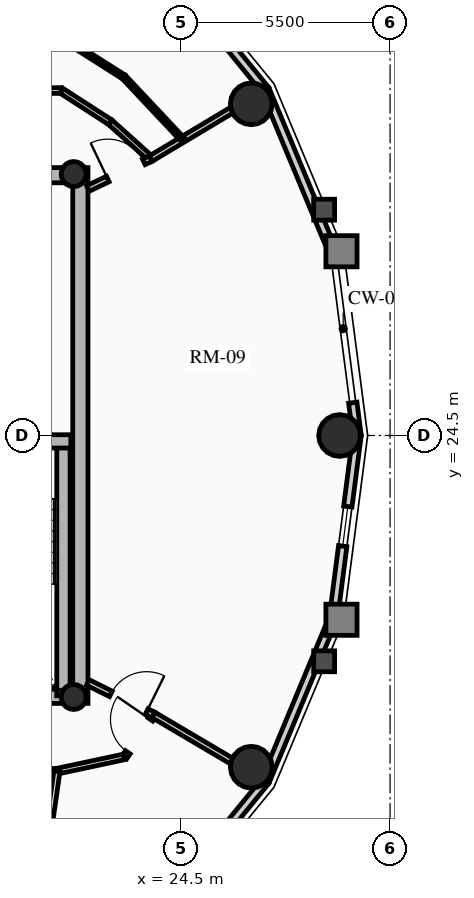
"""IFC4 building model, lengths in metres.
Left out: names, types, materials, properties, quantities, classifications, styles, units other than length and angle.
Written with IfcOpenShell. Run it as: python <this file> out.ifc"""

import sys

from ifc_helpers import new_model, si_unit, direction, frame, frame_2d, origin, origin_2d, place, context, subcontext, project, spatial, rectangle, circle, hollow_circle, extrude, source, transform, mapped, element, fill, save


model = new_model("IFC4")
c1 = context("Model", 3, precision=1e-05, world=origin(), true_north=direction((0.0, 1.0)))
c2 = subcontext(c1, "Body", "Model", "MODEL_VIEW")
j1 = project(units=[si_unit("LENGTHUNIT", "METRE"), si_unit("PLANEANGLEUNIT", "RADIAN")], contexts=[c1])
p1 = place(None, origin())
s1 = spatial("IfcSite", under=j1, at=p1, CompositionType="ELEMENT")
p2 = place(p1, origin())
s2 = spatial("IfcBuilding", under=s1, at=p2, CompositionType="ELEMENT")
p3 = place(p2, frame((0.0, 0.0, 214.12)))
s3 = spatial("IfcBuildingStorey", under=s2, at=p3, CompositionType="ELEMENT", Elevation=214.12)
p4 = place(p3, frame((21.85, 17.45, 0.0), z_axis=(0.0, 0.0, 1.0), x_axis=(0.0, 1.0, 0.0)))
e1 = element("IfcWall", 1, at=p4, inside=s3, PredefinedType="SHEAR", context=c2, shape_type="SweptSolid", body=[
    extrude(rectangle(XDim=14.1, YDim=0.4, at=frame_2d((7.05, 0.0))), origin(), (0.0, 0.0, 1.0), 2.91),
])
p5 = place(p3, frame((11.15, 17.65, 0.0), z_axis=(0.0, 0.0, 1.0), x_axis=(1.0, 0.0, 0.0)))
e2 = element("IfcWall", 2, at=p5, inside=s3, PredefinedType="SHEAR", context=c2, shape_type="SweptSolid", body=[
    extrude(rectangle(XDim=10.7, YDim=0.4, at=frame_2d((5.35, 0.0))), origin(), (0.0, 0.0, 1.0), 2.91),
])
m1 = source(origin(), c2, "Body", "SweptSolid", [
    extrude(rectangle(XDim=1.5, YDim=2.02, at=frame_2d((0.75, 1.01))), frame((0.0, 0.21, 0.0), z_axis=(0.0, -1.0, 0.0), x_axis=(1.0, 0.0, 0.0)), (0.0, 0.0, 1.0), 0.42),
])
p6 = place(p5, frame((5.45, 0.0, 0.0)))
e3 = element("IfcOpeningElement", 3, at=p6, cuts=e2, PredefinedType="OPENING", context=c2, shape_type="MappedRepresentation", body=[
    mapped(m1, transform((0.0, 0.0, 0.0), x_axis=(1.0, 0.0, 0.0), y_axis=(0.0, 1.0, 0.0), z_axis=(0.0, 0.0, 1.0), scale=1.0)),
])
p7 = place(p3, frame((11.15, 31.35, 0.0), z_axis=(0.0, 0.0, 1.0), x_axis=(1.0, 0.0, 0.0)))
e4 = element("IfcWall", 4, at=p7, inside=s3, PredefinedType="SHEAR", context=c2, shape_type="SweptSolid", body=[
    extrude(rectangle(XDim=10.7, YDim=0.4, at=frame_2d((5.35, 0.0))), origin(), (0.0, 0.0, 1.0), 2.91),
])
p8 = place(p7, frame((4.6, 0.0, 0.0)))
e5 = element("IfcOpeningElement", 5, at=p8, cuts=e4, PredefinedType="OPENING", context=c2, shape_type="MappedRepresentation", body=[
    mapped(m1, transform((0.0, 0.0, 0.0), x_axis=(1.0, 0.0, 0.0), y_axis=(0.0, 1.0, 0.0), z_axis=(0.0, 0.0, 1.0), scale=1.0)),
])
p9 = place(p3, frame((21.405, 17.65, 0.0), z_axis=(0.0, 0.0, 1.0), x_axis=(0.0, 1.0, 0.0)))
e6 = element("IfcWall", 6, at=p9, inside=s3, PredefinedType="SHEAR", context=c2, shape_type="SweptSolid", body=[
    extrude(rectangle(XDim=6.695, YDim=0.35, at=frame_2d((3.348, 0.0))), origin(), (0.0, 0.0, 1.0), 2.91),
])
p10 = place(p3, frame((18.315, 24.345, 0.0), z_axis=(0.0, 0.0, 1.0), x_axis=(1.0, 0.0, 0.0)))
e7 = element("IfcWall", 7, at=p10, inside=s3, PredefinedType="SHEAR", context=c2, shape_type="SweptSolid", body=[
    extrude(rectangle(XDim=3.285, YDim=0.35, at=frame_2d((1.643, 0.0))), origin(), (0.0, 0.0, 1.0), 2.91),
])
for number, where, z_axis, x_axis in (
    (8, (21.675, 17.62, 0.0), (0.0, 0.0, 1.0), (1.0, 0.0, 0.0)),
    (9, (21.675, 31.38, 0.0), (0.0, 0.0, 1.0), (1.0, 0.0, 0.0)),
):
    element("IfcColumn", number, at=place(p3, frame(where, z_axis=z_axis, x_axis=x_axis)), inside=s3, PredefinedType="COLUMN", context=c2, shape_type="SweptSolid", body=[
        extrude(hollow_circle(Radius=0.33, WallThickness=0.025, at=origin_2d()), origin(), (0.0, 0.0, 1.0), 2.91),
    ])
for number, where, z_axis, x_axis in (
    (10, (28.672, 24.5, 0.0), (0.0, 0.0, 1.0), (1.0, 0.0, 0.0)),
    (11, (26.347, 33.229, 0.0), (0.0, 0.0, 1.0), (1.0, 0.0, 0.0)),
    (12, (26.347, 15.771, 0.0), (0.0, 0.0, 1.0), (1.0, 0.0, 0.0)),
):
    element("IfcColumn", number, at=place(p3, frame(where, z_axis=z_axis, x_axis=x_axis)), inside=s3, PredefinedType="USERDEFINED", context=c2, shape_type="SweptSolid", body=[
        extrude(circle(Radius=0.55, at=origin_2d()), origin(), (0.0, 0.0, 1.0), 2.91),
    ])
p11 = place(p3, frame((29.018, 25.363, 0.0), z_axis=(0.0, 0.0, 1.0), x_axis=(0.128247365719, -0.991742211054, 0.0)))
e13 = element("IfcWall", 13, at=p11, inside=s3, PredefinedType="SOLIDWALL", context=c2, shape_type="SweptSolid", body=[
    extrude(rectangle(XDim=0.87, YDim=0.22, at=frame_2d((0.435, 0.0))), origin(), (0.0, 0.0, 1.0), 2.322),
])
p12 = place(p3, frame((26.718, 33.593, 0.0), z_axis=(0.0, 0.0, 1.0), x_axis=(0.384036305194, -0.923317993052, 0.0)))
e14 = element("IfcWall", 14, at=p12, inside=s3, PredefinedType="SOLIDWALL", context=c2, shape_type="SweptSolid", body=[
    extrude(rectangle(XDim=4.671, YDim=0.22, at=frame_2d((2.335, 0.0))), origin(), (0.0, 0.0, 1.0), 2.322),
])
p13 = place(p3, frame((23.924, 37.015, 0.0), z_axis=(0.0, 0.0, 1.0), x_axis=(0.632467166636, -0.774587169483, 0.0)))
e15 = element("IfcWall", 15, at=p13, inside=s3, PredefinedType="SOLIDWALL", context=c2, shape_type="SweptSolid", body=[
    extrude(rectangle(XDim=4.418, YDim=0.22, at=frame_2d((2.209, 0.0))), origin(), (0.0, 0.0, 1.0), 2.322),
])
m2 = source(origin(), c2, "Body", "SweptSolid", [
    extrude(rectangle(XDim=1.05, YDim=1.3, at=frame_2d((0.525, 0.65))), frame((0.0, 0.12, 0.0), z_axis=(0.0, -1.0, 0.0), x_axis=(1.0, 0.0, 0.0)), (0.0, 0.0, 1.0), 0.24),
])
p14 = place(p13, frame((1.684, 0.0, 0.65)))
e16 = element("IfcOpeningElement", 16, at=p14, cuts=e15, PredefinedType="OPENING", context=c2, shape_type="MappedRepresentation", body=[
    mapped(m2, transform((0.0, 0.0, 0.0), x_axis=(1.0, 0.0, 0.0), y_axis=(0.0, 1.0, 0.0), z_axis=(0.0, 0.0, 1.0), scale=1.0)),
])
p15 = place(p3, frame((26.718, 15.407, 0.0), z_axis=(0.0, 0.0, 1.0), x_axis=(-0.632467166636, -0.774587169483, 0.0)))
e17 = element("IfcWall", 17, at=p15, inside=s3, PredefinedType="SOLIDWALL", context=c2, shape_type="SweptSolid", body=[
    extrude(rectangle(XDim=4.418, YDim=0.22, at=frame_2d((2.209, 0.0))), origin(), (0.0, 0.0, 1.0), 2.322),
])
p16 = place(p15, frame((1.684, 0.0, 0.65)))
e18 = element("IfcOpeningElement", 18, at=p16, cuts=e17, PredefinedType="OPENING", context=c2, shape_type="MappedRepresentation", body=[
    mapped(m2, transform((0.0, 0.0, 0.0), x_axis=(1.0, 0.0, 0.0), y_axis=(0.0, 1.0, 0.0), z_axis=(0.0, 0.0, 1.0), scale=1.0)),
])
p17 = place(p3, frame((28.512, 19.719, 0.0), z_axis=(0.0, 0.0, 1.0), x_axis=(-0.384036305194, -0.923317993052, 0.0)))
e19 = element("IfcWall", 19, at=p17, inside=s3, PredefinedType="SOLIDWALL", context=c2, shape_type="SweptSolid", body=[
    extrude(rectangle(XDim=4.671, YDim=0.22, at=frame_2d((2.335, 0.0))), origin(), (0.0, 0.0, 1.0), 2.322),
])
p18 = place(p3, frame((29.13, 24.5, 0.0), z_axis=(0.0, 0.0, 1.0), x_axis=(-0.128241318541, -0.991742993027, 0.0)))
e20 = element("IfcWall", 20, at=p18, inside=s3, PredefinedType="SOLIDWALL", context=c2, shape_type="SweptSolid", body=[
    extrude(rectangle(XDim=4.82, YDim=0.22, at=frame_2d((2.41, 0.0))), origin(), (0.0, 0.0, 1.0), 2.322),
])
p19 = place(p18, frame((1.885, 0.0, 0.65)))
e21 = element("IfcOpeningElement", 21, at=p19, cuts=e20, PredefinedType="OPENING", context=c2, shape_type="MappedRepresentation", body=[
    mapped(m2, transform((0.0, 0.0, 0.0), x_axis=(1.0, 0.0, 0.0), y_axis=(0.0, 1.0, 0.0), z_axis=(0.0, 0.0, 1.0), scale=1.0)),
])
p20 = place(p3, frame((23.701, 31.786, 0.0), z_axis=(0.0, 0.0, 1.0), x_axis=(-0.743742806382, 0.668465883913, 0.0)))
e22 = element("IfcWall", 22, at=p20, inside=s3, PredefinedType="PARTITIONING", context=c2, shape_type="SweptSolid", body=[
    extrude(rectangle(XDim=1.434, YDim=0.15, at=frame_2d((0.717, 0.0))), origin(), (0.0, 0.0, 1.0), 2.322),
])
p21 = place(p3, frame((22.635, 32.744, 0.0), z_axis=(0.0, 0.0, 1.0), x_axis=(-0.840119270642, 0.542401706391, 0.0)))
e23 = element("IfcWall", 23, at=p21, inside=s3, PredefinedType="PARTITIONING", context=c2, shape_type="SweptSolid", body=[
    extrude(rectangle(XDim=1.538, YDim=0.15, at=frame_2d((0.769, 0.0))), origin(), (0.0, 0.0, 1.0), 2.255),
])
p22 = place(p3, frame((21.344, 33.578, 0.0), z_axis=(0.0, 0.0, 1.0), x_axis=(-0.999984243152, -0.005613684, 0.0)))
e24 = element("IfcWall", 24, at=p22, inside=s3, PredefinedType="PARTITIONING", context=c2, shape_type="SweptSolid", body=[
    extrude(rectangle(XDim=3.262, YDim=0.15, at=frame_2d((1.631, 0.0))), origin(), (0.0, 0.0, 1.0), 2.322),
])
m3 = source(origin(), c2, "Body", "SweptSolid", [
    extrude(rectangle(XDim=1.05, YDim=2.015, at=frame_2d((0.525, 1.007))), frame((0.0, 0.085, 0.0), z_axis=(0.0, -1.0, 0.0), x_axis=(1.0, 0.0, 0.0)), (0.0, 0.0, 1.0), 0.17),
])
p23 = place(p22, frame((1.599, 0.0, 0.0)))
e25 = element("IfcOpeningElement", 25, at=p23, cuts=e24, PredefinedType="OPENING", context=c2, shape_type="MappedRepresentation", body=[
    mapped(m3, transform((0.0, 0.0, 0.0), x_axis=(1.0, 0.0, 0.0), y_axis=(0.0, 1.0, 0.0), z_axis=(0.0, 0.0, 1.0), scale=1.0)),
])
p24 = place(p3, frame((14.845, 15.441, 0.0), z_axis=(0.0, 0.0, 1.0), x_axis=(0.99938794868, 0.034981824334, 0.0)))
e26 = element("IfcWall", 26, at=p24, inside=s3, PredefinedType="PARTITIONING", context=c2, shape_type="SweptSolid", body=[
    extrude(rectangle(XDim=6.393, YDim=0.15, at=frame_2d((3.196, 0.0))), origin(), (0.0, 0.0, 1.0), 2.255),
])
p25 = place(p3, frame((21.234, 15.664, 0.0), z_axis=(0.0, 0.0, 1.0), x_axis=(0.977931581182, 0.208925399431, 0.0)))
e27 = element("IfcWall", 27, at=p25, inside=s3, PredefinedType="PARTITIONING", context=c2, shape_type="SweptSolid", body=[
    extrude(rectangle(XDim=1.823, YDim=0.15, at=frame_2d((0.912, 0.0))), origin(), (0.0, 0.0, 1.0), 2.255),
])
p26 = place(p3, frame((23.017, 16.045, 0.0), z_axis=(0.0, 0.0, 1.0), x_axis=(0.566660656138, 0.823951273308, 0.0)))
e28 = element("IfcWall", 28, at=p26, inside=s3, PredefinedType="PARTITIONING", context=c2, shape_type="SweptSolid", body=[
    extrude(rectangle(XDim=1.336, YDim=0.15, at=frame_2d((0.668, 0.0))), origin(), (0.0, 0.0, 1.0), 2.322),
])
p27 = place(p26, frame((0.143, 0.0, 0.0)))
e29 = element("IfcOpeningElement", 29, at=p27, cuts=e28, PredefinedType="OPENING", context=c2, shape_type="MappedRepresentation", body=[
    mapped(m3, transform((0.0, 0.0, 0.0), x_axis=(1.0, 0.0, 0.0), y_axis=(0.0, 1.0, 0.0), z_axis=(0.0, 0.0, 1.0), scale=1.0)),
])
p28 = place(p3, frame((23.701, 31.786, 0.0), z_axis=(0.0, 0.0, 1.0), x_axis=(0.858059206709, 0.513550774298, 0.0)))
e30 = element("IfcWall", 30, at=p28, inside=s3, PredefinedType="PARTITIONING", context=c2, shape_type="SweptSolid", body=[
    extrude(rectangle(XDim=3.497, YDim=0.16, at=frame_2d((1.748, 0.0))), origin(), (0.0, 0.0, 1.0), 2.322),
])
p29 = place(p3, frame((21.234, 15.664, 0.0), z_axis=(0.0, 0.0, 1.0), x_axis=(-0.141467563045, -0.989942891588, 0.0)))
e31 = element("IfcWall", 31, at=p29, inside=s3, PredefinedType="PARTITIONING", context=c2, shape_type="SweptSolid", body=[
    extrude(rectangle(XDim=5.918, YDim=0.16, at=frame_2d((2.959, 0.0))), origin(), (0.0, 0.0, 1.0), 2.322),
])
p30 = place(p3, frame((23.774, 17.146, 0.0), z_axis=(0.0, 0.0, 1.0), x_axis=(0.861296601099, -0.508102514198, 0.0)))
e32 = element("IfcWall", 32, at=p30, inside=s3, PredefinedType="PARTITIONING", context=c2, shape_type="SweptSolid", body=[
    extrude(rectangle(XDim=3.399, YDim=0.16, at=frame_2d((1.7, 0.0))), origin(), (0.0, 0.0, 1.0), 2.322),
])
p31 = place(p3, frame((22.05, 31.0, 0.0), z_axis=(0.0, 0.0, 1.0), x_axis=(0.903013459407, 0.429612257891, 0.0)))
e33 = element("IfcWall", 33, at=p31, inside=s3, PredefinedType="PARTITIONING", context=c2, shape_type="SweptSolid", body=[
    extrude(rectangle(XDim=1.829, YDim=0.16, at=frame_2d((0.914, 0.0))), origin(), (0.0, 0.0, 1.0), 2.255),
])
m4 = source(origin(), c2, "Body", "SweptSolid", [
    extrude(rectangle(XDim=1.05, YDim=2.015, at=frame_2d((0.525, 1.007))), frame((0.0, 0.09, 0.0), z_axis=(0.0, -1.0, 0.0), x_axis=(1.0, 0.0, 0.0)), (0.0, 0.0, 1.0), 0.18),
])
p32 = place(p31, frame((0.579, 0.0, 0.0)))
e34 = element("IfcOpeningElement", 34, at=p32, cuts=e33, PredefinedType="OPENING", context=c2, shape_type="MappedRepresentation", body=[
    mapped(m4, transform((0.0, 0.0, 0.0), x_axis=(1.0, 0.0, 0.0), y_axis=(0.0, 1.0, 0.0), z_axis=(0.0, 0.0, 1.0), scale=1.0)),
])
p33 = place(p3, frame((22.05, 18.0, 0.0), z_axis=(0.0, 0.0, 1.0), x_axis=(0.896045848613, -0.443961526692, 0.0)))
e35 = element("IfcWall", 35, at=p33, inside=s3, PredefinedType="PARTITIONING", context=c2, shape_type="SweptSolid", body=[
    extrude(rectangle(XDim=1.924, YDim=0.16, at=frame_2d((0.962, 0.0))), origin(), (0.0, 0.0, 1.0), 2.255),
])
p34 = place(p33, frame((0.674, 0.0, 0.0)))
e36 = element("IfcOpeningElement", 36, at=p34, cuts=e35, PredefinedType="OPENING", context=c2, shape_type="MappedRepresentation", body=[
    mapped(m4, transform((0.0, 0.0, 0.0), x_axis=(1.0, 0.0, 0.0), y_axis=(0.0, 1.0, 0.0), z_axis=(0.0, 0.0, 1.0), scale=1.0)),
])
p35 = place(p3, frame((24.542, 32.288, 0.0), z_axis=(0.0, 0.0, 1.0), x_axis=(-0.68501091047, 0.72853280814, 0.0)))
e37 = element("IfcWall", 37, at=p35, inside=s3, PredefinedType="PARTITIONING", context=c2, shape_type="SweptSolid", body=[
    extrude(rectangle(XDim=2.261, YDim=0.125, at=frame_2d((1.13, 0.0))), origin(), (0.0, 0.0, 1.0), 2.322),
])
p36 = place(p3, frame((22.993, 33.935, 0.0), z_axis=(0.0, 0.0, 1.0), x_axis=(-0.844312558894, 0.535851008112, 0.0)))
e38 = element("IfcWall", 38, at=p36, inside=s3, PredefinedType="PARTITIONING", context=c2, shape_type="SweptSolid", body=[
    extrude(rectangle(XDim=2.268, YDim=0.125, at=frame_2d((1.134, 0.0))), origin(), (0.0, 0.0, 1.0), 2.255),
])
m5 = source(origin(), c2, "Body", "SweptSolid", [
    extrude(rectangle(XDim=1.05, YDim=1.3, at=frame_2d((0.525, 0.65))), frame((0.0, 0.03, 0.0), z_axis=(0.0, -1.0, 0.0), x_axis=(1.0, 0.0, 0.0)), (0.0, 0.0, 1.0), 0.06),
])
p37 = place(p19, origin())
e39 = element("IfcWindow", 39, at=p37, inside=s3, PartitioningType="SINGLE_PANEL", PredefinedType="WINDOW", context=c2, shape_type="MappedRepresentation", body=[
    mapped(m5, transform((0.0, 0.0, 0.0), x_axis=(1.0, 0.0, 0.0), y_axis=(0.0, 1.0, 0.0), z_axis=(0.0, 0.0, 1.0), scale=1.0)),
])
fill(e21, e39)
m6 = source(origin(), c2, "Body", "SweptSolid", [
    extrude(rectangle(XDim=1.05, YDim=2.015, at=frame_2d((0.525, 1.007))), frame((0.0, 0.025, 0.0), z_axis=(0.0, -1.0, 0.0), x_axis=(1.0, 0.0, 0.0)), (0.0, 0.0, 1.0), 0.05),
])
p38 = place(p32, origin())
e40 = element("IfcDoor", 40, at=p38, inside=s3, OperationType="SINGLE_SWING_LEFT", PredefinedType="DOOR", context=c2, shape_type="MappedRepresentation", body=[
    mapped(m6, transform((0.0, 0.0, 0.0), x_axis=(1.0, 0.0, 0.0), y_axis=(0.0, 1.0, 0.0), z_axis=(0.0, 0.0, 1.0), scale=1.0)),
])
fill(e34, e40)
p39 = place(p34, origin())
e41 = element("IfcDoor", 41, at=p39, inside=s3, OperationType="SINGLE_SWING_RIGHT", PredefinedType="DOOR", context=c2, shape_type="MappedRepresentation", body=[
    mapped(m6, transform((0.0, 0.0, 0.0), x_axis=(1.0, 0.0, 0.0), y_axis=(0.0, 1.0, 0.0), z_axis=(0.0, 0.0, 1.0), scale=1.0)),
])
fill(e36, e41)
p40 = place(p27, origin())
e42 = element("IfcDoor", 42, at=p40, inside=s3, OperationType="SINGLE_SWING_RIGHT", PredefinedType="DOOR", context=c2, shape_type="MappedRepresentation", body=[
    mapped(m6, transform((0.0, 0.0, 0.0), x_axis=(1.0, 0.0, 0.0), y_axis=(0.0, 1.0, 0.0), z_axis=(0.0, 0.0, 1.0), scale=1.0)),
])
fill(e29, e42)
save(model, sys.argv[1])
